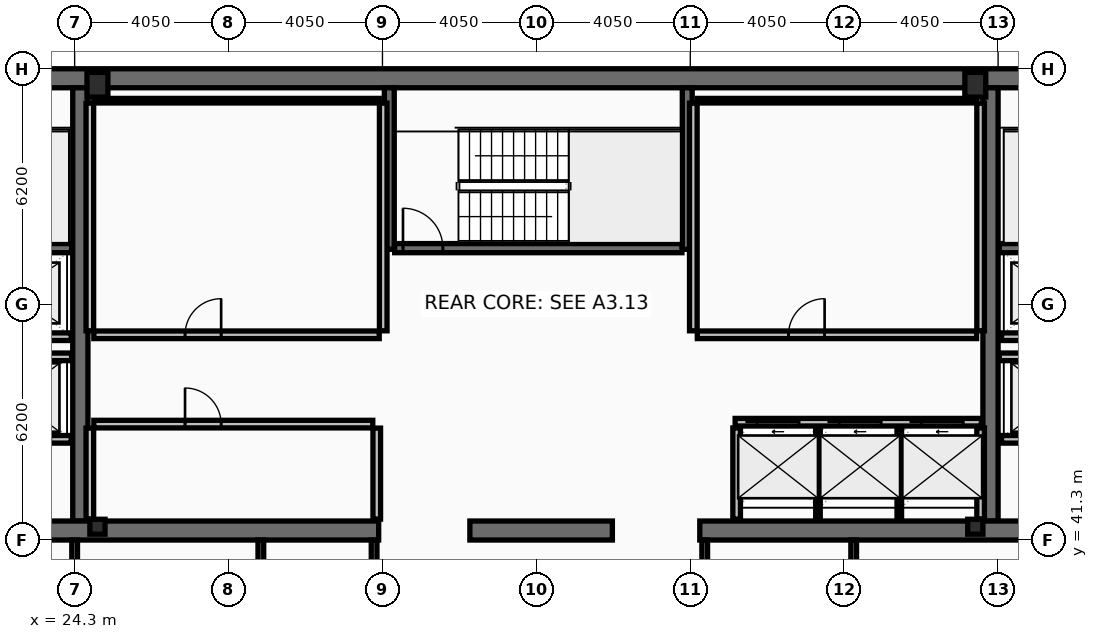
"""IFC4 building model, lengths in metres.
Left out: names, types, materials, properties, quantities, classifications, styles, units other than length and angle.
Written with IfcOpenShell. Run it as: python <this file> out.ifc"""

import sys

from ifc_helpers import new_model, si_unit, direction, frame, frame_2d, origin, origin_2d, place, context, subcontext, project, spatial, rectangle, hollow_rectangle, i_section, extrude, element, fill, save


model = new_model("IFC4")
c1 = context("Model", 3, precision=1e-05, world=origin(), true_north=direction((0.0, 1.0)))
c2 = subcontext(c1, "Body", "Model", "MODEL_VIEW")
j1 = project(units=[si_unit("LENGTHUNIT", "METRE"), si_unit("PLANEANGLEUNIT", "RADIAN")], contexts=[c1])
p1 = place(None, origin())
s1 = spatial("IfcSite", under=j1, at=p1, CompositionType="ELEMENT")
p2 = place(p1, origin())
s2 = spatial("IfcBuilding", under=s1, at=p2, CompositionType="ELEMENT")
p3 = place(p2, frame((0.0, 0.0, 336.2)))
s3 = spatial("IfcBuildingStorey", under=s2, at=p3, CompositionType="ELEMENT", Elevation=336.2)
p4 = place(p3, frame((16.2, 53.45, 0.0), z_axis=(0.0, 0.0, 1.0), x_axis=(1.0, 0.0, 0.0)))
e1 = element("IfcWall", 1, at=p4, inside=s3, PredefinedType="SHEAR", context=c2, shape_type="SweptSolid", body=[
    extrude(rectangle(XDim=40.5, YDim=0.5, at=frame_2d((20.25, 0.0))), origin(), (0.0, 0.0, 1.0), 3.44),
])
for number, where, z_axis, x_axis in (
    (2, (24.45, 41.8, 0.0), (0.0, 0.0, 1.0), (0.0, 1.0, 0.0)),
    (3, (48.4, 41.8, 0.0), (0.0, 0.0, 1.0), (0.0, 1.0, 0.0)),
):
    element("IfcWall", number, at=place(p3, frame(where, z_axis=z_axis, x_axis=x_axis)), inside=s3, PredefinedType="SHEAR", context=c2, shape_type="SweptSolid", body=[
        extrude(rectangle(XDim=11.4, YDim=0.4, at=frame_2d((5.7, 0.0))), origin(), (0.0, 0.0, 1.0), 3.44),
    ])
p5 = place(p3, frame((32.3, 41.55, 0.0), z_axis=(0.0, 0.0, 1.0), x_axis=(-1.0, 0.0, 0.0)))
e4 = element("IfcWall", 4, at=p5, inside=s3, PredefinedType="SHEAR", context=c2, shape_type="SweptSolid", body=[
    extrude(rectangle(XDim=11.45, YDim=0.5, at=frame_2d((5.725, 0.0))), origin(), (0.0, 0.0, 1.0), 3.44),
])
p6 = place(p3, frame((38.45, 41.55, 0.0), z_axis=(0.0, 0.0, 1.0), x_axis=(-1.0, 0.0, 0.0)))
e5 = element("IfcWall", 5, at=p6, inside=s3, PredefinedType="SHEAR", context=c2, shape_type="SweptSolid", body=[
    extrude(rectangle(XDim=3.75, YDim=0.5, at=frame_2d((1.875, 0.0))), origin(), (0.0, 0.0, 1.0), 3.44),
])
p7 = place(p3, frame((52.05, 41.55, 0.0), z_axis=(0.0, 0.0, 1.0), x_axis=(-1.0, 0.0, 0.0)))
e6 = element("IfcWall", 6, at=p7, inside=s3, PredefinedType="SHEAR", context=c2, shape_type="SweptSolid", body=[
    extrude(rectangle(XDim=11.3, YDim=0.5, at=frame_2d((5.65, 0.0))), origin(), (0.0, 0.0, 1.0), 3.44),
])
for number, where, z_axis, x_axis in (
    (7, (32.58, 48.95, 0.0), (0.0, 0.0, 1.0), (0.0, 1.0, 0.0)),
    (8, (40.42, 48.95, 0.0), (0.0, 0.0, 1.0), (0.0, 1.0, 0.0)),
):
    element("IfcWall", number, at=place(p3, frame(where, z_axis=z_axis, x_axis=x_axis)), inside=s3, PredefinedType="SHEAR", context=c2, shape_type="SweptSolid", body=[
        extrude(rectangle(XDim=4.25, YDim=0.26, at=frame_2d((2.125, 0.0))), origin(), (0.0, 0.0, 1.0), 3.44),
    ])
p8 = place(p3, frame((16.7, 48.98, 0.0), z_axis=(0.0, 0.0, 1.0), x_axis=(1.0, 0.0, 0.0)))
e9 = element("IfcWall", 9, at=p8, inside=s3, PredefinedType="SHEAR", context=c2, shape_type="SweptSolid", body=[
    extrude(rectangle(XDim=7.52, YDim=0.24, at=frame_2d((3.76, 0.0))), origin(), (0.0, 0.0, 1.0), 3.44),
])
p9 = place(p8, frame((0.22, 0.0, 0.0)))
e10 = element("IfcOpeningElement", 10, at=p9, cuts=e9, PredefinedType="OPENING", context=c2, shape_type="SweptSolid", body=[
    extrude(rectangle(XDim=1.05, YDim=2.15, at=frame_2d((0.525, 1.075))), frame((0.0, 0.13, 0.0), z_axis=(0.0, -1.0, 0.0), x_axis=(1.0, 0.0, 0.0)), (0.0, 0.0, 1.0), 0.26),
])
p10 = place(p3, frame((48.63, 48.98, 0.0), z_axis=(0.0, 0.0, 1.0), x_axis=(1.0, 0.0, 0.0)))
e11 = element("IfcWall", 11, at=p10, inside=s3, PredefinedType="SHEAR", context=c2, shape_type="SweptSolid", body=[
    extrude(rectangle(XDim=7.57, YDim=0.24, at=frame_2d((3.785, 0.0))), origin(), (0.0, 0.0, 1.0), 3.44),
])
p11 = place(p10, frame((6.3, 0.0, 0.0)))
e12 = element("IfcOpeningElement", 12, at=p11, cuts=e11, PredefinedType="OPENING", context=c2, shape_type="SweptSolid", body=[
    extrude(rectangle(XDim=1.05, YDim=2.15, at=frame_2d((0.525, 1.075))), frame((0.0, 0.13, 0.0), z_axis=(0.0, -1.0, 0.0), x_axis=(1.0, 0.0, 0.0)), (0.0, 0.0, 1.0), 0.26),
])
p12 = place(p3, frame((32.72, 48.98, 0.0), z_axis=(0.0, 0.0, 1.0), x_axis=(1.0, 0.0, 0.0)))
e13 = element("IfcWall", 13, at=p12, inside=s3, PredefinedType="SHEAR", context=c2, shape_type="SweptSolid", body=[
    extrude(rectangle(XDim=7.56, YDim=0.24, at=frame_2d((3.78, 0.0))), origin(), (0.0, 0.0, 1.0), 3.44),
])
p13 = place(p12, frame((0.22, 0.0, 0.0)))
e14 = element("IfcOpeningElement", 14, at=p13, cuts=e13, PredefinedType="OPENING", context=c2, shape_type="SweptSolid", body=[
    extrude(rectangle(XDim=1.05, YDim=2.15, at=frame_2d((0.525, 1.075))), frame((0.0, 0.13, 0.0), z_axis=(0.0, -1.0, 0.0), x_axis=(1.0, 0.0, 0.0)), (0.0, 0.0, 1.0), 0.26),
])
for number, where, z_axis, x_axis in (
    (15, (24.9, 53.28, 0.0), (0.0, 0.0, 1.0), (1.0, 0.0, 0.0)),
    (16, (48.0, 53.28, 0.0), (0.0, 0.0, 1.0), (1.0, 0.0, 0.0)),
):
    element("IfcColumn", number, at=place(p3, frame(where, z_axis=z_axis, x_axis=x_axis)), inside=s3, PredefinedType="COLUMN", context=c2, shape_type="SweptSolid", body=[
        extrude(hollow_rectangle(XDim=0.55, YDim=0.65, WallThickness=0.04, at=origin_2d()), origin(), (0.0, 0.0, 1.0), 3.6),
    ])
for number, where, z_axis, x_axis in (
    (17, (24.9, 41.65, 0.0), (0.0, 0.0, 1.0), (1.0, 0.0, 0.0)),
    (18, (48.0, 41.65, 0.0), (0.0, 0.0, 1.0), (1.0, 0.0, 0.0)),
):
    element("IfcColumn", number, at=place(p3, frame(where, z_axis=z_axis, x_axis=x_axis)), inside=s3, PredefinedType="COLUMN", context=c2, shape_type="SweptSolid", body=[
        extrude(i_section(OverallWidth=0.399, OverallDepth=0.393, WebThickness=0.023, FlangeThickness=0.037, at=origin_2d()), origin(), (0.0, 0.0, 1.0), 3.6),
    ])
p14 = place(p3, frame((41.68, 44.4, 0.0), z_axis=(0.0, 0.0, 1.0), x_axis=(1.0, 0.0, 0.0)))
e19 = element("IfcWall", 19, at=p14, inside=s3, PredefinedType="PARTITIONING", context=c2, shape_type="SweptSolid", body=[
    extrude(rectangle(XDim=6.48, YDim=0.2, at=frame_2d((3.24, 0.0))), origin(), (0.0, 0.0, 1.0), 3.44),
])
p15 = place(p14, frame((0.58, 0.0, 0.0)))
e20 = element("IfcOpeningElement", 20, at=p15, cuts=e19, PredefinedType="OPENING", context=c2, shape_type="SweptSolid", body=[
    extrude(rectangle(XDim=1.1, YDim=2.18, at=frame_2d((0.55, 1.09))), frame((0.0, 0.11, 0.0), z_axis=(0.0, -1.0, 0.0), x_axis=(1.0, 0.0, 0.0)), (0.0, 0.0, 1.0), 0.22),
])
p16 = place(p14, frame((2.74, 0.0, 0.0)))
e21 = element("IfcOpeningElement", 21, at=p16, cuts=e19, PredefinedType="OPENING", context=c2, shape_type="SweptSolid", body=[
    extrude(rectangle(XDim=1.1, YDim=2.18, at=frame_2d((0.55, 1.09))), frame((0.0, 0.11, 0.0), z_axis=(0.0, -1.0, 0.0), x_axis=(1.0, 0.0, 0.0)), (0.0, 0.0, 1.0), 0.22),
])
p17 = place(p14, frame((4.9, 0.0, 0.0)))
e22 = element("IfcOpeningElement", 22, at=p17, cuts=e19, PredefinedType="OPENING", context=c2, shape_type="SweptSolid", body=[
    extrude(rectangle(XDim=1.1, YDim=2.18, at=frame_2d((0.55, 1.09))), frame((0.0, 0.11, 0.0), z_axis=(0.0, -1.0, 0.0), x_axis=(1.0, 0.0, 0.0)), (0.0, 0.0, 1.0), 0.22),
])
p18 = place(p3, frame((51.61, 43.95, 0.0), z_axis=(0.0, 0.0, 1.0), x_axis=(-1.0, 0.0, 0.0)))
e23 = element("IfcWall", 23, at=p18, inside=s3, PredefinedType="PARTITIONING", context=c2, shape_type="SweptSolid", body=[
    extrude(rectangle(XDim=2.92, YDim=0.2, at=frame_2d((1.46, 0.0))), origin(), (0.0, 0.0, 1.0), 3.44),
])
p19 = place(p18, frame((0.81, 0.0, 0.0)))
e24 = element("IfcOpeningElement", 24, at=p19, cuts=e23, PredefinedType="OPENING", context=c2, shape_type="SweptSolid", body=[
    extrude(rectangle(XDim=1.3, YDim=2.18, at=frame_2d((0.65, 1.09))), frame((0.0, 0.11, 0.0), z_axis=(0.0, -1.0, 0.0), x_axis=(1.0, 0.0, 0.0)), (0.0, 0.0, 1.0), 0.22),
])
p20 = place(p3, frame((24.21, 43.95, 0.0), z_axis=(0.0, 0.0, 1.0), x_axis=(-1.0, 0.0, 0.0)))
e25 = element("IfcWall", 25, at=p20, inside=s3, PredefinedType="PARTITIONING", context=c2, shape_type="SweptSolid", body=[
    extrude(rectangle(XDim=2.97, YDim=0.2, at=frame_2d((1.485, 0.0))), origin(), (0.0, 0.0, 1.0), 3.44),
])
p21 = place(p20, frame((0.86, 0.0, 0.0)))
e26 = element("IfcOpeningElement", 26, at=p21, cuts=e25, PredefinedType="OPENING", context=c2, shape_type="SweptSolid", body=[
    extrude(rectangle(XDim=1.3, YDim=2.18, at=frame_2d((0.65, 1.09))), frame((0.0, 0.11, 0.0), z_axis=(0.0, -1.0, 0.0), x_axis=(1.0, 0.0, 0.0)), (0.0, 0.0, 1.0), 0.22),
])
p22 = place(p3, frame((51.61, 46.65, 0.0), z_axis=(0.0, 0.0, 1.0), x_axis=(-1.0, 0.0, 0.0)))
e27 = element("IfcWall", 27, at=p22, inside=s3, PredefinedType="PARTITIONING", context=c2, shape_type="SweptSolid", body=[
    extrude(rectangle(XDim=2.92, YDim=0.2, at=frame_2d((1.46, 0.0))), origin(), (0.0, 0.0, 1.0), 3.44),
])
p23 = place(p22, frame((0.86, 0.0, 0.0)))
e28 = element("IfcOpeningElement", 28, at=p23, cuts=e27, PredefinedType="OPENING", context=c2, shape_type="SweptSolid", body=[
    extrude(rectangle(XDim=1.2, YDim=2.18, at=frame_2d((0.6, 1.09))), frame((0.0, 0.11, 0.0), z_axis=(0.0, -1.0, 0.0), x_axis=(1.0, 0.0, 0.0)), (0.0, 0.0, 1.0), 0.22),
])
p24 = place(p3, frame((24.21, 46.65, 0.0), z_axis=(0.0, 0.0, 1.0), x_axis=(-1.0, 0.0, 0.0)))
e29 = element("IfcWall", 29, at=p24, inside=s3, PredefinedType="PARTITIONING", context=c2, shape_type="SweptSolid", body=[
    extrude(rectangle(XDim=2.97, YDim=0.2, at=frame_2d((1.485, 0.0))), origin(), (0.0, 0.0, 1.0), 3.44),
])
p25 = place(p24, frame((0.91, 0.0, 0.0)))
e30 = element("IfcOpeningElement", 30, at=p25, cuts=e29, PredefinedType="OPENING", context=c2, shape_type="SweptSolid", body=[
    extrude(rectangle(XDim=1.2, YDim=2.18, at=frame_2d((0.6, 1.09))), frame((0.0, 0.11, 0.0), z_axis=(0.0, -1.0, 0.0), x_axis=(1.0, 0.0, 0.0)), (0.0, 0.0, 1.0), 0.22),
])
p26 = place(p3, frame((21.2, 46.12, 0.0), z_axis=(0.0, 0.0, 1.0), x_axis=(1.0, 0.0, 0.0)))
e31 = element("IfcWall", 31, at=p26, inside=s3, PredefinedType="PARTITIONING", context=c2, shape_type="SweptSolid", body=[
    extrude(rectangle(XDim=3.02, YDim=0.2, at=frame_2d((1.51, 0.0))), origin(), (0.0, 0.0, 1.0), 3.44),
])
p27 = place(p3, frame((48.63, 46.12, 0.0), z_axis=(0.0, 0.0, 1.0), x_axis=(1.0, 0.0, 0.0)))
e32 = element("IfcWall", 32, at=p27, inside=s3, PredefinedType="PARTITIONING", context=c2, shape_type="SweptSolid", body=[
    extrude(rectangle(XDim=3.07, YDim=0.2, at=frame_2d((1.535, 0.0))), origin(), (0.0, 0.0, 1.0), 3.44),
])
for number, where, z_axis, x_axis in (
    (33, (24.7, 46.805, 0.0), (0.0, 0.0, 1.0), (0.0, 1.0, 0.0)),
    (34, (32.42, 46.805, 0.0), (0.0, 0.0, 1.0), (0.0, 1.0, 0.0)),
):
    element("IfcWall", number, at=place(p3, frame(where, z_axis=z_axis, x_axis=x_axis)), inside=s3, PredefinedType="PARTITIONING", context=c2, shape_type="SweptSolid", body=[
        extrude(rectangle(XDim=5.99, YDim=0.2, at=frame_2d((2.995, 0.0))), origin(), (0.0, 0.0, 1.0), 3.44),
    ])
p28 = place(p3, frame((24.805, 52.86, 0.0), z_axis=(0.0, 0.0, 1.0), x_axis=(1.0, 0.0, 0.0)))
e35 = element("IfcWall", 35, at=p28, inside=s3, PredefinedType="PARTITIONING", context=c2, shape_type="SweptSolid", body=[
    extrude(rectangle(XDim=7.51, YDim=0.12, at=frame_2d((3.755, 0.0))), origin(), (0.0, 0.0, 1.0), 3.44),
])
p29 = place(p3, frame((24.805, 46.7, 0.0), z_axis=(0.0, 0.0, 1.0), x_axis=(1.0, 0.0, 0.0)))
e36 = element("IfcWall", 36, at=p29, inside=s3, PredefinedType="PARTITIONING", context=c2, shape_type="SweptSolid", body=[
    extrude(rectangle(XDim=7.51, YDim=0.2, at=frame_2d((3.755, 0.0))), origin(), (0.0, 0.0, 1.0), 3.44),
])
p30 = place(p29, frame((2.4, 0.0, 0.0)))
e37 = element("IfcOpeningElement", 37, at=p30, cuts=e36, PredefinedType="OPENING", context=c2, shape_type="SweptSolid", body=[
    extrude(rectangle(XDim=0.95, YDim=2.1, at=frame_2d((0.475, 1.05))), frame((0.0, 0.11, 0.0), z_axis=(0.0, -1.0, 0.0), x_axis=(1.0, 0.0, 0.0)), (0.0, 0.0, 1.0), 0.22),
])
for number, where, z_axis, x_axis in (
    (38, (24.7, 41.85, 0.0), (0.0, 0.0, 1.0), (0.0, 1.0, 0.0)),
    (39, (32.25, 41.85, 0.0), (0.0, 0.0, 1.0), (0.0, 1.0, 0.0)),
):
    element("IfcWall", number, at=place(p3, frame(where, z_axis=z_axis, x_axis=x_axis)), inside=s3, PredefinedType="PARTITIONING", context=c2, shape_type="SweptSolid", body=[
        extrude(rectangle(XDim=2.395, YDim=0.2, at=frame_2d((1.198, 0.0))), origin(), (0.0, 0.0, 1.0), 3.44),
    ])
p31 = place(p3, frame((24.805, 44.35, 0.0), z_axis=(0.0, 0.0, 1.0), x_axis=(1.0, 0.0, 0.0)))
e40 = element("IfcWall", 40, at=p31, inside=s3, PredefinedType="PARTITIONING", context=c2, shape_type="SweptSolid", body=[
    extrude(rectangle(XDim=7.34, YDim=0.2, at=frame_2d((3.67, 0.0))), origin(), (0.0, 0.0, 1.0), 3.44),
])
p32 = place(p31, frame((2.4, 0.0, 0.0)))
e41 = element("IfcOpeningElement", 41, at=p32, cuts=e40, PredefinedType="OPENING", context=c2, shape_type="SweptSolid", body=[
    extrude(rectangle(XDim=0.95, YDim=2.1, at=frame_2d((0.475, 1.05))), frame((0.0, 0.11, 0.0), z_axis=(0.0, -1.0, 0.0), x_axis=(1.0, 0.0, 0.0)), (0.0, 0.0, 1.0), 0.22),
])
for number, where, z_axis, x_axis in (
    (42, (40.58, 46.805, 0.0), (0.0, 0.0, 1.0), (0.0, 1.0, 0.0)),
    (43, (48.14, 46.805, 0.0), (0.0, 0.0, 1.0), (0.0, 1.0, 0.0)),
):
    element("IfcWall", number, at=place(p3, frame(where, z_axis=z_axis, x_axis=x_axis)), inside=s3, PredefinedType="PARTITIONING", context=c2, shape_type="SweptSolid", body=[
        extrude(rectangle(XDim=5.99, YDim=0.2, at=frame_2d((2.995, 0.0))), origin(), (0.0, 0.0, 1.0), 3.44),
    ])
p33 = place(p3, frame((40.685, 52.86, 0.0), z_axis=(0.0, 0.0, 1.0), x_axis=(1.0, 0.0, 0.0)))
e44 = element("IfcWall", 44, at=p33, inside=s3, PredefinedType="PARTITIONING", context=c2, shape_type="SweptSolid", body=[
    extrude(rectangle(XDim=7.35, YDim=0.12, at=frame_2d((3.675, 0.0))), origin(), (0.0, 0.0, 1.0), 3.44),
])
p34 = place(p3, frame((40.685, 46.7, 0.0), z_axis=(0.0, 0.0, 1.0), x_axis=(1.0, 0.0, 0.0)))
e45 = element("IfcWall", 45, at=p34, inside=s3, PredefinedType="PARTITIONING", context=c2, shape_type="SweptSolid", body=[
    extrude(rectangle(XDim=7.35, YDim=0.2, at=frame_2d((3.675, 0.0))), origin(), (0.0, 0.0, 1.0), 3.44),
])
p35 = place(p34, frame((2.4, 0.0, 0.0)))
e46 = element("IfcOpeningElement", 46, at=p35, cuts=e45, PredefinedType="OPENING", context=c2, shape_type="SweptSolid", body=[
    extrude(rectangle(XDim=0.95, YDim=2.1, at=frame_2d((0.475, 1.05))), frame((0.0, 0.11, 0.0), z_axis=(0.0, -1.0, 0.0), x_axis=(1.0, 0.0, 0.0)), (0.0, 0.0, 1.0), 0.22),
])
for number, where, z_axis, x_axis in (
    (47, (41.72, 41.85, 0.0), (0.0, 0.0, 1.0), (0.0, 1.0, 0.0)),
    (48, (48.14, 41.85, 0.0), (0.0, 0.0, 1.0), (0.0, 1.0, 0.0)),
):
    element("IfcWall", number, at=place(p3, frame(where, z_axis=z_axis, x_axis=x_axis)), inside=s3, PredefinedType="PARTITIONING", context=c2, shape_type="SweptSolid", body=[
        extrude(rectangle(XDim=2.4, YDim=0.2, at=frame_2d((1.2, 0.0))), origin(), (0.0, 0.0, 1.0), 3.44),
    ])
for number, where, z_axis, x_axis in (
    (49, (43.86, 41.85, 0.0), (0.0, 0.0, 1.0), (0.0, 1.0, 0.0)),
    (50, (46.0, 41.85, 0.0), (0.0, 0.0, 1.0), (0.0, 1.0, 0.0)),
):
    element("IfcWall", number, at=place(p3, frame(where, z_axis=z_axis, x_axis=x_axis)), inside=s3, PredefinedType="PARTITIONING", context=c2, shape_type="SweptSolid", body=[
        extrude(rectangle(XDim=2.4, YDim=0.12, at=frame_2d((1.2, 0.0))), origin(), (0.0, 0.0, 1.0), 3.44),
    ])
for number, where, z_axis, x_axis in (
    (51, (24.3, 38.28, 0.0), (0.0, 0.0, 1.0), (0.0, 1.0, 0.0)),
    (52, (29.2, 38.28, 0.0), (0.0, 0.0, 1.0), (0.0, 1.0, 0.0)),
    (53, (32.18, 38.28, 0.0), (0.0, 0.0, 1.0), (0.0, 1.0, 0.0)),
    (54, (40.88, 38.28, 0.0), (0.0, 0.0, 1.0), (0.0, 1.0, 0.0)),
    (55, (44.8, 38.28, 0.0), (0.0, 0.0, 1.0), (0.0, 1.0, 0.0)),
):
    element("IfcWall", number, at=place(p3, frame(where, z_axis=z_axis, x_axis=x_axis)), inside=s3, PredefinedType="PARTITIONING", context=c2, shape_type="SweptSolid", body=[
        extrude(rectangle(XDim=3.02, YDim=0.15, at=frame_2d((1.51, 0.0))), origin(), (0.0, 0.0, 1.0), 3.44),
    ])
p36 = place(p13, origin())
e56 = element("IfcDoor", 56, at=p36, inside=s3, OperationType="SINGLE_SWING_LEFT", PredefinedType="DOOR", context=c2, shape_type="SweptSolid", body=[
    extrude(rectangle(XDim=1.05, YDim=2.15, at=frame_2d((0.525, 1.075))), frame((0.0, 0.025, 0.0), z_axis=(0.0, -1.0, 0.0), x_axis=(1.0, 0.0, 0.0)), (0.0, 0.0, 1.0), 0.05),
])
fill(e14, e56)
p37 = place(p15, origin())
e57 = element("IfcDoor", 57, at=p37, inside=s3, OperationType="SLIDING_TO_LEFT", PredefinedType="DOOR", context=c2, shape_type="SweptSolid", body=[
    extrude(rectangle(XDim=1.1, YDim=2.18, at=frame_2d((0.55, 1.09))), frame((0.0, 0.025, 0.0), z_axis=(0.0, -1.0, 0.0), x_axis=(1.0, 0.0, 0.0)), (0.0, 0.0, 1.0), 0.05),
])
fill(e20, e57)
p38 = place(p16, origin())
e58 = element("IfcDoor", 58, at=p38, inside=s3, OperationType="SLIDING_TO_LEFT", PredefinedType="DOOR", context=c2, shape_type="SweptSolid", body=[
    extrude(rectangle(XDim=1.1, YDim=2.18, at=frame_2d((0.55, 1.09))), frame((0.0, 0.025, 0.0), z_axis=(0.0, -1.0, 0.0), x_axis=(1.0, 0.0, 0.0)), (0.0, 0.0, 1.0), 0.05),
])
fill(e21, e58)
p39 = place(p17, origin())
e59 = element("IfcDoor", 59, at=p39, inside=s3, OperationType="SLIDING_TO_LEFT", PredefinedType="DOOR", context=c2, shape_type="SweptSolid", body=[
    extrude(rectangle(XDim=1.1, YDim=2.18, at=frame_2d((0.55, 1.09))), frame((0.0, 0.025, 0.0), z_axis=(0.0, -1.0, 0.0), x_axis=(1.0, 0.0, 0.0)), (0.0, 0.0, 1.0), 0.05),
])
fill(e22, e59)
p40 = place(p30, origin())
e60 = element("IfcDoor", 60, at=p40, inside=s3, OperationType="SINGLE_SWING_RIGHT", PredefinedType="DOOR", context=c2, shape_type="SweptSolid", body=[
    extrude(rectangle(XDim=0.95, YDim=2.1, at=frame_2d((0.475, 1.05))), frame((0.0, 0.025, 0.0), z_axis=(0.0, -1.0, 0.0), x_axis=(1.0, 0.0, 0.0)), (0.0, 0.0, 1.0), 0.05),
])
fill(e37, e60)
p41 = place(p32, origin())
e61 = element("IfcDoor", 61, at=p41, inside=s3, OperationType="SINGLE_SWING_LEFT", PredefinedType="DOOR", context=c2, shape_type="SweptSolid", body=[
    extrude(rectangle(XDim=0.95, YDim=2.1, at=frame_2d((0.475, 1.05))), frame((0.0, 0.025, 0.0), z_axis=(0.0, -1.0, 0.0), x_axis=(1.0, 0.0, 0.0)), (0.0, 0.0, 1.0), 0.05),
])
fill(e41, e61)
p42 = place(p35, origin())
e62 = element("IfcDoor", 62, at=p42, inside=s3, OperationType="SINGLE_SWING_RIGHT", PredefinedType="DOOR", context=c2, shape_type="SweptSolid", body=[
    extrude(rectangle(XDim=0.95, YDim=2.1, at=frame_2d((0.475, 1.05))), frame((0.0, 0.025, 0.0), z_axis=(0.0, -1.0, 0.0), x_axis=(1.0, 0.0, 0.0)), (0.0, 0.0, 1.0), 0.05),
])
fill(e46, e62)
save(model, sys.argv[1])
